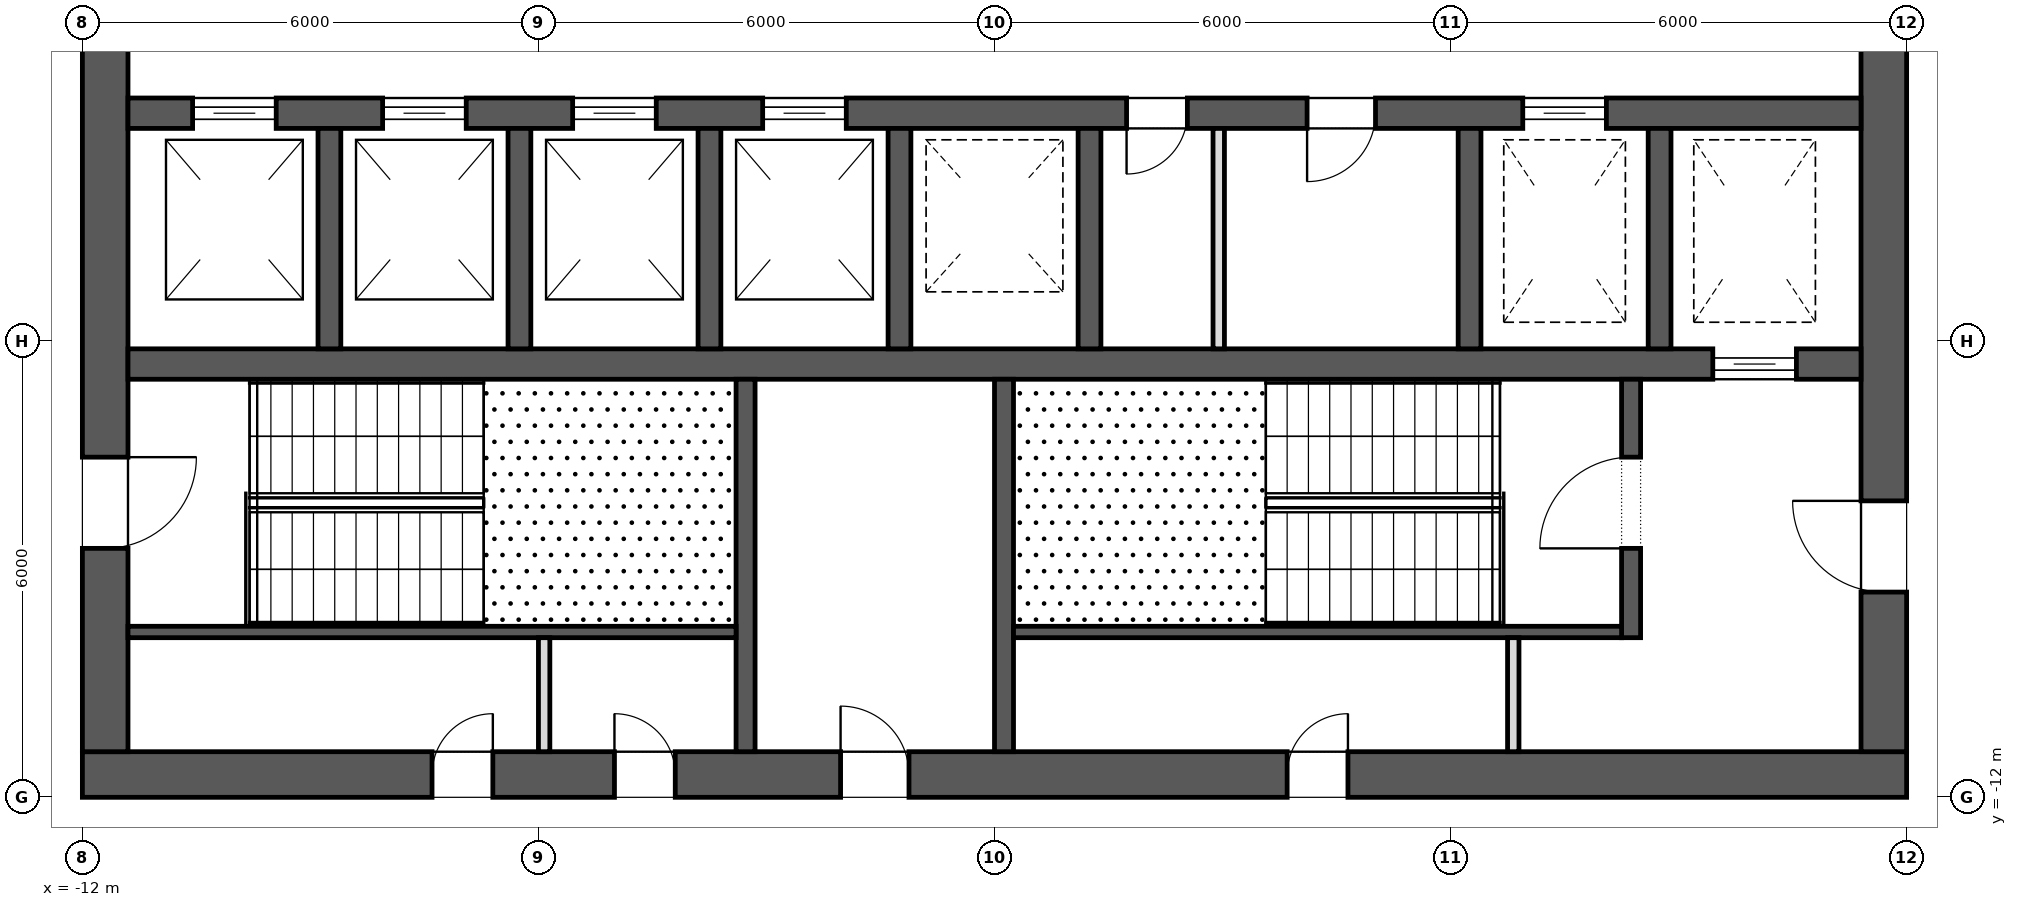
"""IFC4 building model, lengths in metres.
Left out: names, types, materials, properties, quantities, classifications, styles, units other than length and angle.
Written with IfcOpenShell. Run it as: python <this file> out.ifc"""

import sys

from ifc_helpers import new_model, si_unit, direction, frame, frame_2d, origin, place, context, subcontext, project, spatial, rectangle, extrude, element, fill, save


model = new_model("IFC4")
c1 = context("Model", 3, precision=1e-05, world=origin(), true_north=direction((0.0, 1.0)))
c2 = subcontext(c1, "Body", "Model", "MODEL_VIEW")
j1 = project(units=[si_unit("LENGTHUNIT", "METRE"), si_unit("PLANEANGLEUNIT", "RADIAN")], contexts=[c1])
p1 = place(None, origin())
s1 = spatial("IfcSite", under=j1, at=p1, CompositionType="ELEMENT")
p2 = place(p1, origin())
s2 = spatial("IfcBuilding", under=s1, at=p2, CompositionType="ELEMENT")
p3 = place(p2, frame((0.0, 0.0, 198.9)))
s3 = spatial("IfcBuildingStorey", under=s2, at=p3, CompositionType="ELEMENT", Elevation=198.9)
p4 = place(p3, frame((-12.0, -11.7, 0.0), z_axis=(0.0, 0.0, 1.0), x_axis=(1.0, 0.0, 0.0)))
e1 = element("IfcWall", 1, at=p4, inside=s3, PredefinedType="SHEAR", context=c2, shape_type="SweptSolid", body=[
    extrude(rectangle(XDim=24.0, YDim=0.6, at=frame_2d((12.0, 0.0))), origin(), (0.0, 0.0, 1.0), 4.0),
])
p5 = place(p4, frame((9.975, 0.0, 0.0)))
e2 = element("IfcOpeningElement", 2, at=p5, cuts=e1, PredefinedType="OPENING", context=c2, shape_type="SweptSolid", body=[
    extrude(rectangle(XDim=0.9, YDim=2.1, at=frame_2d((0.45, 1.05))), frame((0.0, 0.312, 0.0), z_axis=(0.0, -1.0, 0.0), x_axis=(1.0, 0.0, 0.0)), (0.0, 0.0, 1.0), 0.624),
])
p6 = place(p4, frame((4.6, 0.0, 0.0)))
e3 = element("IfcOpeningElement", 3, at=p6, cuts=e1, PredefinedType="OPENING", context=c2, shape_type="SweptSolid", body=[
    extrude(rectangle(XDim=0.8, YDim=2.1, at=frame_2d((0.4, 1.05))), frame((0.0, 0.312, 0.0), z_axis=(0.0, -1.0, 0.0), x_axis=(1.0, 0.0, 0.0)), (0.0, 0.0, 1.0), 0.624),
])
p7 = place(p4, frame((7.0, 0.0, 0.0)))
e4 = element("IfcOpeningElement", 4, at=p7, cuts=e1, PredefinedType="OPENING", context=c2, shape_type="SweptSolid", body=[
    extrude(rectangle(XDim=0.8, YDim=2.1, at=frame_2d((0.4, 1.05))), frame((0.0, 0.312, 0.0), z_axis=(0.0, -1.0, 0.0), x_axis=(1.0, 0.0, 0.0)), (0.0, 0.0, 1.0), 0.624),
])
p8 = place(p4, frame((15.85, 0.0, 0.0)))
e5 = element("IfcOpeningElement", 5, at=p8, cuts=e1, PredefinedType="OPENING", context=c2, shape_type="SweptSolid", body=[
    extrude(rectangle(XDim=0.8, YDim=2.1, at=frame_2d((0.4, 1.05))), frame((0.0, 0.312, 0.0), z_axis=(0.0, -1.0, 0.0), x_axis=(1.0, 0.0, 0.0)), (0.0, 0.0, 1.0), 0.624),
])
p9 = place(p3, frame((11.7, -11.4, 0.0), z_axis=(0.0, 0.0, 1.0), x_axis=(0.0, 1.0, 0.0)))
e6 = element("IfcWall", 6, at=p9, inside=s3, PredefinedType="SHEAR", context=c2, shape_type="SweptSolid", body=[
    extrude(rectangle(XDim=22.8, YDim=0.6, at=frame_2d((11.4, 0.0))), origin(), (0.0, 0.0, 1.0), 4.0),
])
p10 = place(p9, frame((10.2, 0.0, 0.0)))
e7 = element("IfcOpeningElement", 7, at=p10, cuts=e6, PredefinedType="OPENING", context=c2, shape_type="SweptSolid", body=[
    extrude(rectangle(XDim=2.4, YDim=2.1, at=frame_2d((1.2, 1.05))), frame((0.0, 0.312, 0.0), z_axis=(0.0, -1.0, 0.0), x_axis=(1.0, 0.0, 0.0)), (0.0, 0.0, 1.0), 0.624),
])
p11 = place(p9, frame((19.5, 0.0, 0.0)))
e8 = element("IfcOpeningElement", 8, at=p11, cuts=e6, PredefinedType="OPENING", context=c2, shape_type="SweptSolid", body=[
    extrude(rectangle(XDim=1.2, YDim=2.1, at=frame_2d((0.6, 1.05))), frame((0.0, 0.312, 0.0), z_axis=(0.0, -1.0, 0.0), x_axis=(1.0, 0.0, 0.0)), (0.0, 0.0, 1.0), 0.624),
])
p12 = place(p9, frame((2.1, 0.0, 0.0)))
e9 = element("IfcOpeningElement", 9, at=p12, cuts=e6, PredefinedType="OPENING", context=c2, shape_type="SweptSolid", body=[
    extrude(rectangle(XDim=1.2, YDim=2.1, at=frame_2d((0.6, 1.05))), frame((0.0, 0.312, 0.0), z_axis=(0.0, -1.0, 0.0), x_axis=(1.0, 0.0, 0.0)), (0.0, 0.0, 1.0), 0.624),
])
p13 = place(p3, frame((-11.7, -11.4, 0.0), z_axis=(0.0, 0.0, 1.0), x_axis=(0.0, 1.0, 0.0)))
e10 = element("IfcWall", 10, at=p13, inside=s3, PredefinedType="SHEAR", context=c2, shape_type="SweptSolid", body=[
    extrude(rectangle(XDim=22.8, YDim=0.6, at=frame_2d((11.4, 0.0))), origin(), (0.0, 0.0, 1.0), 4.0),
])
p14 = place(p13, frame((10.2, 0.0, 0.0)))
e11 = element("IfcOpeningElement", 11, at=p14, cuts=e10, PredefinedType="OPENING", context=c2, shape_type="SweptSolid", body=[
    extrude(rectangle(XDim=2.4, YDim=2.1, at=frame_2d((1.2, 1.05))), frame((0.0, 0.312, 0.0), z_axis=(0.0, -1.0, 0.0), x_axis=(1.0, 0.0, 0.0)), (0.0, 0.0, 1.0), 0.624),
])
p15 = place(p13, frame((18.925, 0.0, 0.0)))
e12 = element("IfcOpeningElement", 12, at=p15, cuts=e10, PredefinedType="OPENING", context=c2, shape_type="SweptSolid", body=[
    extrude(rectangle(XDim=1.2, YDim=2.1, at=frame_2d((0.6, 1.05))), frame((0.0, 0.312, 0.0), z_axis=(0.0, -1.0, 0.0), x_axis=(1.0, 0.0, 0.0)), (0.0, 0.0, 1.0), 0.624),
])
p16 = place(p13, frame((2.675, 0.0, 0.0)))
e13 = element("IfcOpeningElement", 13, at=p16, cuts=e10, PredefinedType="OPENING", context=c2, shape_type="SweptSolid", body=[
    extrude(rectangle(XDim=1.2, YDim=2.1, at=frame_2d((0.6, 1.05))), frame((0.0, 0.312, 0.0), z_axis=(0.0, -1.0, 0.0), x_axis=(1.0, 0.0, 0.0)), (0.0, 0.0, 1.0), 0.624),
])
p17 = place(p3, frame((-11.4, -3.0, 0.0), z_axis=(0.0, 0.0, 1.0), x_axis=(1.0, 0.0, 0.0)))
e14 = element("IfcWall", 14, at=p17, inside=s3, PredefinedType="SHEAR", context=c2, shape_type="SweptSolid", body=[
    extrude(rectangle(XDim=22.8, YDim=0.4, at=frame_2d((11.4, 0.0))), origin(), (0.0, 0.0, 1.0), 4.0),
])
p18 = place(p17, frame((0.85, 0.0, 0.0)))
e15 = element("IfcOpeningElement", 15, at=p18, cuts=e14, PredefinedType="OPENING", context=c2, shape_type="SweptSolid", body=[
    extrude(rectangle(XDim=1.1, YDim=2.1, at=frame_2d((0.55, 1.05))), frame((0.0, 0.212, 0.0), z_axis=(0.0, -1.0, 0.0), x_axis=(1.0, 0.0, 0.0)), (0.0, 0.0, 1.0), 0.424),
])
p19 = place(p17, frame((3.35, 0.0, 0.0)))
e16 = element("IfcOpeningElement", 16, at=p19, cuts=e14, PredefinedType="OPENING", context=c2, shape_type="SweptSolid", body=[
    extrude(rectangle(XDim=1.1, YDim=2.1, at=frame_2d((0.55, 1.05))), frame((0.0, 0.212, 0.0), z_axis=(0.0, -1.0, 0.0), x_axis=(1.0, 0.0, 0.0)), (0.0, 0.0, 1.0), 0.424),
])
p20 = place(p17, frame((5.85, 0.0, 0.0)))
e17 = element("IfcOpeningElement", 17, at=p20, cuts=e14, PredefinedType="OPENING", context=c2, shape_type="SweptSolid", body=[
    extrude(rectangle(XDim=1.1, YDim=2.1, at=frame_2d((0.55, 1.05))), frame((0.0, 0.212, 0.0), z_axis=(0.0, -1.0, 0.0), x_axis=(1.0, 0.0, 0.0)), (0.0, 0.0, 1.0), 0.424),
])
p21 = place(p17, frame((8.35, 0.0, 0.0)))
e18 = element("IfcOpeningElement", 18, at=p21, cuts=e14, PredefinedType="OPENING", context=c2, shape_type="SweptSolid", body=[
    extrude(rectangle(XDim=1.1, YDim=2.1, at=frame_2d((0.55, 1.05))), frame((0.0, 0.212, 0.0), z_axis=(0.0, -1.0, 0.0), x_axis=(1.0, 0.0, 0.0)), (0.0, 0.0, 1.0), 0.424),
])
p22 = place(p17, frame((18.35, 0.0, 0.0)))
e19 = element("IfcOpeningElement", 19, at=p22, cuts=e14, PredefinedType="OPENING", context=c2, shape_type="SweptSolid", body=[
    extrude(rectangle(XDim=1.1, YDim=2.1, at=frame_2d((0.55, 1.05))), frame((0.0, 0.212, 0.0), z_axis=(0.0, -1.0, 0.0), x_axis=(1.0, 0.0, 0.0)), (0.0, 0.0, 1.0), 0.424),
])
p23 = place(p17, frame((13.137, 0.0, 0.0)))
e20 = element("IfcOpeningElement", 20, at=p23, cuts=e14, PredefinedType="OPENING", context=c2, shape_type="SweptSolid", body=[
    extrude(rectangle(XDim=0.8, YDim=2.1, at=frame_2d((0.4, 1.05))), frame((0.0, 0.212, 0.0), z_axis=(0.0, -1.0, 0.0), x_axis=(1.0, 0.0, 0.0)), (0.0, 0.0, 1.0), 0.424),
])
p24 = place(p17, frame((15.512, 0.0, 0.0)))
e21 = element("IfcOpeningElement", 21, at=p24, cuts=e14, PredefinedType="OPENING", context=c2, shape_type="SweptSolid", body=[
    extrude(rectangle(XDim=0.9, YDim=2.1, at=frame_2d((0.45, 1.05))), frame((0.0, 0.212, 0.0), z_axis=(0.0, -1.0, 0.0), x_axis=(1.0, 0.0, 0.0)), (0.0, 0.0, 1.0), 0.424),
])
p25 = place(p3, frame((-11.4, -6.3, 0.0), z_axis=(0.0, 0.0, 1.0), x_axis=(1.0, 0.0, 0.0)))
e22 = element("IfcWall", 22, at=p25, inside=s3, PredefinedType="SHEAR", context=c2, shape_type="SweptSolid", body=[
    extrude(rectangle(XDim=22.8, YDim=0.4, at=frame_2d((11.4, 0.0))), origin(), (0.0, 0.0, 1.0), 4.0),
])
p26 = place(p25, frame((20.85, 0.0, 0.0)))
e23 = element("IfcOpeningElement", 23, at=p26, cuts=e22, PredefinedType="OPENING", context=c2, shape_type="SweptSolid", body=[
    extrude(rectangle(XDim=1.1, YDim=2.1, at=frame_2d((0.55, 1.05))), frame((0.0, 0.212, 0.0), z_axis=(0.0, -1.0, 0.0), x_axis=(1.0, 0.0, 0.0)), (0.0, 0.0, 1.0), 0.424),
])
for number, where, z_axis, x_axis in (
    (24, (-8.75, -6.1, 0.0), (0.0, 0.0, 1.0), (0.0, 1.0, 0.0)),
    (25, (-6.25, -6.1, 0.0), (0.0, 0.0, 1.0), (0.0, 1.0, 0.0)),
    (26, (-3.75, -6.1, 0.0), (0.0, 0.0, 1.0), (0.0, 1.0, 0.0)),
    (27, (-1.25, -6.1, 0.0), (0.0, 0.0, 1.0), (0.0, 1.0, 0.0)),
    (28, (1.25, -6.1, 0.0), (0.0, 0.0, 1.0), (0.0, 1.0, 0.0)),
    (29, (6.25, -6.1, 0.0), (0.0, 0.0, 1.0), (0.0, 1.0, 0.0)),
    (30, (8.75, -6.1, 0.0), (0.0, 0.0, 1.0), (0.0, 1.0, 0.0)),
):
    element("IfcWall", number, at=place(p3, frame(where, z_axis=z_axis, x_axis=x_axis)), inside=s3, PredefinedType="SHEAR", context=c2, shape_type="SweptSolid", body=[
        extrude(rectangle(XDim=2.9, YDim=0.3, at=frame_2d((1.45, 0.0))), origin(), (0.0, 0.0, 1.0), 4.0),
    ])
for number, where, z_axis, x_axis in (
    (31, (-3.275, -11.4, 0.0), (0.0, 0.0, 1.0), (0.0, 1.0, 0.0)),
    (32, (0.125, -11.4, 0.0), (0.0, 0.0, 1.0), (0.0, 1.0, 0.0)),
):
    element("IfcWall", number, at=place(p3, frame(where, z_axis=z_axis, x_axis=x_axis)), inside=s3, PredefinedType="SHEAR", context=c2, shape_type="SweptSolid", body=[
        extrude(rectangle(XDim=4.9, YDim=0.25, at=frame_2d((2.45, 0.0))), origin(), (0.0, 0.0, 1.0), 3.7),
    ])
p27 = place(p3, frame((8.375, -9.9, 0.0), z_axis=(0.0, 0.0, 1.0), x_axis=(0.0, 1.0, 0.0)))
e33 = element("IfcWall", 33, at=p27, inside=s3, PredefinedType="SHEAR", context=c2, shape_type="SweptSolid", body=[
    extrude(rectangle(XDim=3.4, YDim=0.25, at=frame_2d((1.7, 0.0))), origin(), (0.0, 0.0, 1.0), 3.7),
])
p28 = place(p27, frame((1.175, 0.0, 0.0)))
e34 = element("IfcOpeningElement", 34, at=p28, cuts=e33, PredefinedType="OPENING", context=c2, shape_type="SweptSolid", body=[
    extrude(rectangle(XDim=1.2, YDim=2.1, at=frame_2d((0.6, 1.05))), frame((0.0, 0.137, 0.0), z_axis=(0.0, -1.0, 0.0), x_axis=(1.0, 0.0, 0.0)), (0.0, 0.0, 1.0), 0.274),
])
for number, where, z_axis, x_axis in (
    (35, (-11.4, -9.825, 0.0), (0.0, 0.0, 1.0), (1.0, 0.0, 0.0)),
    (36, (0.25, -9.825, 0.0), (0.0, 0.0, 1.0), (1.0, 0.0, 0.0)),
):
    element("IfcWall", number, at=place(p3, frame(where, z_axis=z_axis, x_axis=x_axis)), inside=s3, PredefinedType="SHEAR", context=c2, shape_type="SweptSolid", body=[
        extrude(rectangle(XDim=8.0, YDim=0.15, at=frame_2d((4.0, 0.0))), origin(), (0.0, 0.0, 1.0), 3.7),
    ])
for number, where, z_axis, x_axis in (
    (37, (-5.925, -11.4, 0.0), (0.0, 0.0, 1.0), (0.0, 1.0, 0.0)),
    (38, (6.825, -11.4, 0.0), (0.0, 0.0, 1.0), (0.0, 1.0, 0.0)),
):
    element("IfcWall", number, at=place(p3, frame(where, z_axis=z_axis, x_axis=x_axis)), inside=s3, PredefinedType="PARTITIONING", context=c2, shape_type="SweptSolid", body=[
        extrude(rectangle(XDim=1.5, YDim=0.15, at=frame_2d((0.75, 0.0))), origin(), (0.0, 0.0, 1.0), 3.7),
    ])
p29 = place(p3, frame((2.95, -6.1, 0.0), z_axis=(0.0, 0.0, 1.0), x_axis=(0.0, 1.0, 0.0)))
e39 = element("IfcWall", 39, at=p29, inside=s3, PredefinedType="PARTITIONING", context=c2, shape_type="SweptSolid", body=[
    extrude(rectangle(XDim=2.9, YDim=0.15, at=frame_2d((1.45, 0.0))), origin(), (0.0, 0.0, 1.0), 3.7),
])
p30 = place(p26, origin())
e40 = element("IfcDoor", 40, at=p30, inside=s3, OperationType="SLIDING_TO_LEFT", PredefinedType="DOOR", context=c2, shape_type="SweptSolid", body=[
    extrude(rectangle(XDim=1.1, YDim=2.1, at=frame_2d((0.55, 1.05))), frame((0.0, 0.025, 0.0), z_axis=(0.0, -1.0, 0.0), x_axis=(1.0, 0.0, 0.0)), (0.0, 0.0, 1.0), 0.05),
])
fill(e23, e40)
p31 = place(p18, origin())
e41 = element("IfcDoor", 41, at=p31, inside=s3, OperationType="SLIDING_TO_LEFT", PredefinedType="DOOR", context=c2, shape_type="SweptSolid", body=[
    extrude(rectangle(XDim=1.1, YDim=2.1, at=frame_2d((0.55, 1.05))), frame((0.0, 0.025, 0.0), z_axis=(0.0, -1.0, 0.0), x_axis=(1.0, 0.0, 0.0)), (0.0, 0.0, 1.0), 0.05),
])
fill(e15, e41)
p32 = place(p19, origin())
e42 = element("IfcDoor", 42, at=p32, inside=s3, OperationType="SLIDING_TO_LEFT", PredefinedType="DOOR", context=c2, shape_type="SweptSolid", body=[
    extrude(rectangle(XDim=1.1, YDim=2.1, at=frame_2d((0.55, 1.05))), frame((0.0, 0.025, 0.0), z_axis=(0.0, -1.0, 0.0), x_axis=(1.0, 0.0, 0.0)), (0.0, 0.0, 1.0), 0.05),
])
fill(e16, e42)
p33 = place(p20, origin())
e43 = element("IfcDoor", 43, at=p33, inside=s3, OperationType="SLIDING_TO_LEFT", PredefinedType="DOOR", context=c2, shape_type="SweptSolid", body=[
    extrude(rectangle(XDim=1.1, YDim=2.1, at=frame_2d((0.55, 1.05))), frame((0.0, 0.025, 0.0), z_axis=(0.0, -1.0, 0.0), x_axis=(1.0, 0.0, 0.0)), (0.0, 0.0, 1.0), 0.05),
])
fill(e17, e43)
p34 = place(p21, origin())
e44 = element("IfcDoor", 44, at=p34, inside=s3, OperationType="SLIDING_TO_LEFT", PredefinedType="DOOR", context=c2, shape_type="SweptSolid", body=[
    extrude(rectangle(XDim=1.1, YDim=2.1, at=frame_2d((0.55, 1.05))), frame((0.0, 0.025, 0.0), z_axis=(0.0, -1.0, 0.0), x_axis=(1.0, 0.0, 0.0)), (0.0, 0.0, 1.0), 0.05),
])
fill(e18, e44)
p35 = place(p22, origin())
e45 = element("IfcDoor", 45, at=p35, inside=s3, OperationType="SLIDING_TO_LEFT", PredefinedType="DOOR", context=c2, shape_type="SweptSolid", body=[
    extrude(rectangle(XDim=1.1, YDim=2.1, at=frame_2d((0.55, 1.05))), frame((0.0, 0.025, 0.0), z_axis=(0.0, -1.0, 0.0), x_axis=(1.0, 0.0, 0.0)), (0.0, 0.0, 1.0), 0.05),
])
fill(e19, e45)
p36 = place(p16, frame((1.2, 0.0, 0.0), z_axis=(0.0, 0.0, 1.0), x_axis=(-1.0, 0.0, 0.0)))
e46 = element("IfcDoor", 46, at=p36, inside=s3, OperationType="SINGLE_SWING_RIGHT", PredefinedType="DOOR", context=c2, shape_type="SweptSolid", body=[
    extrude(rectangle(XDim=1.2, YDim=2.1, at=frame_2d((0.6, 1.05))), frame((0.0, 0.025, 0.0), z_axis=(0.0, -1.0, 0.0), x_axis=(1.0, 0.0, 0.0)), (0.0, 0.0, 1.0), 0.05),
])
fill(e13, e46)
p37 = place(p28, origin())
e47 = element("IfcDoor", 47, at=p37, inside=s3, OperationType="SINGLE_SWING_RIGHT", PredefinedType="DOOR", context=c2, shape_type="SweptSolid", body=[
    extrude(rectangle(XDim=1.2, YDim=2.1, at=frame_2d((0.6, 1.05))), frame((0.0, 0.025, 0.0), z_axis=(0.0, -1.0, 0.0), x_axis=(1.0, 0.0, 0.0)), (0.0, 0.0, 1.0), 0.05),
])
fill(e34, e47)
p38 = place(p12, origin())
e48 = element("IfcDoor", 48, at=p38, inside=s3, OperationType="SINGLE_SWING_LEFT", PredefinedType="DOOR", context=c2, shape_type="SweptSolid", body=[
    extrude(rectangle(XDim=1.2, YDim=2.1, at=frame_2d((0.6, 1.05))), frame((0.0, 0.025, 0.0), z_axis=(0.0, -1.0, 0.0), x_axis=(1.0, 0.0, 0.0)), (0.0, 0.0, 1.0), 0.05),
])
fill(e9, e48)
p39 = place(p5, origin())
e49 = element("IfcDoor", 49, at=p39, inside=s3, OperationType="SINGLE_SWING_RIGHT", PredefinedType="DOOR", context=c2, shape_type="SweptSolid", body=[
    extrude(rectangle(XDim=0.9, YDim=2.1, at=frame_2d((0.45, 1.05))), frame((0.0, 0.025, 0.0), z_axis=(0.0, -1.0, 0.0), x_axis=(1.0, 0.0, 0.0)), (0.0, 0.0, 1.0), 0.05),
])
fill(e2, e49)
p40 = place(p6, origin())
e50 = element("IfcDoor", 50, at=p40, inside=s3, OperationType="SINGLE_SWING_LEFT", PredefinedType="DOOR", context=c2, shape_type="SweptSolid", body=[
    extrude(rectangle(XDim=0.8, YDim=2.1, at=frame_2d((0.4, 1.05))), frame((0.0, 0.025, 0.0), z_axis=(0.0, -1.0, 0.0), x_axis=(1.0, 0.0, 0.0)), (0.0, 0.0, 1.0), 0.05),
])
fill(e3, e50)
p41 = place(p7, origin())
e51 = element("IfcDoor", 51, at=p41, inside=s3, OperationType="SINGLE_SWING_RIGHT", PredefinedType="DOOR", context=c2, shape_type="SweptSolid", body=[
    extrude(rectangle(XDim=0.8, YDim=2.1, at=frame_2d((0.4, 1.05))), frame((0.0, 0.025, 0.0), z_axis=(0.0, -1.0, 0.0), x_axis=(1.0, 0.0, 0.0)), (0.0, 0.0, 1.0), 0.05),
])
fill(e4, e51)
p42 = place(p8, origin())
e52 = element("IfcDoor", 52, at=p42, inside=s3, OperationType="SINGLE_SWING_LEFT", PredefinedType="DOOR", context=c2, shape_type="SweptSolid", body=[
    extrude(rectangle(XDim=0.8, YDim=2.1, at=frame_2d((0.4, 1.05))), frame((0.0, 0.025, 0.0), z_axis=(0.0, -1.0, 0.0), x_axis=(1.0, 0.0, 0.0)), (0.0, 0.0, 1.0), 0.05),
])
fill(e5, e52)
p43 = place(p23, frame((0.8, 0.0, 0.0), z_axis=(0.0, 0.0, 1.0), x_axis=(-1.0, 0.0, 0.0)))
e53 = element("IfcDoor", 53, at=p43, inside=s3, OperationType="SINGLE_SWING_LEFT", PredefinedType="DOOR", context=c2, shape_type="SweptSolid", body=[
    extrude(rectangle(XDim=0.8, YDim=2.1, at=frame_2d((0.4, 1.05))), frame((0.0, 0.025, 0.0), z_axis=(0.0, -1.0, 0.0), x_axis=(1.0, 0.0, 0.0)), (0.0, 0.0, 1.0), 0.05),
])
fill(e20, e53)
p44 = place(p24, frame((0.9, 0.0, 0.0), z_axis=(0.0, 0.0, 1.0), x_axis=(-1.0, 0.0, 0.0)))
e54 = element("IfcDoor", 54, at=p44, inside=s3, OperationType="SINGLE_SWING_LEFT", PredefinedType="DOOR", context=c2, shape_type="SweptSolid", body=[
    extrude(rectangle(XDim=0.9, YDim=2.1, at=frame_2d((0.45, 1.05))), frame((0.0, 0.025, 0.0), z_axis=(0.0, -1.0, 0.0), x_axis=(1.0, 0.0, 0.0)), (0.0, 0.0, 1.0), 0.05),
])
fill(e21, e54)
save(model, sys.argv[1])
